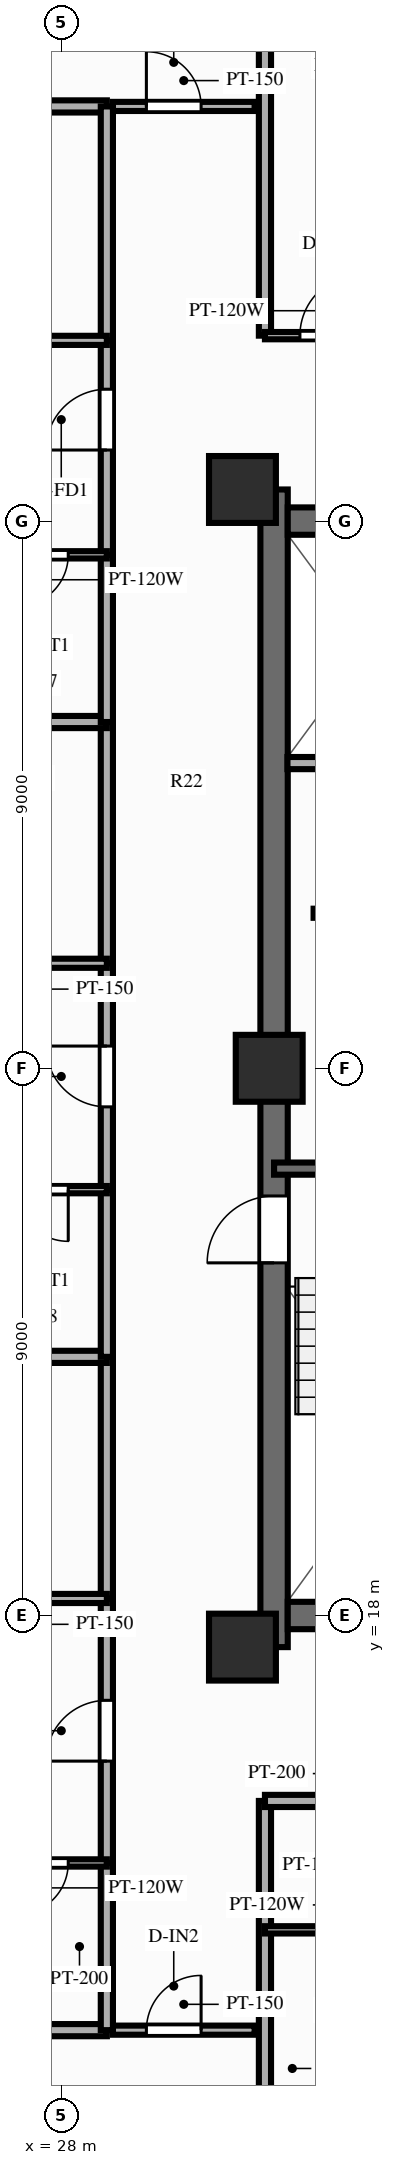
"""IFC4 building model, lengths in metres.
Left out: names, types, materials, properties, quantities, classifications, styles, units other than length and angle.
Written with IfcOpenShell. Run it as: python <this file> out.ifc"""

import sys

from ifc_helpers import new_model, si_unit, direction, frame, frame_2d, origin, origin_2d, place, context, subcontext, project, spatial, rectangle, extrude, source, transform, mapped, element, fill, save


model = new_model("IFC4")
c1 = context("Model", 3, precision=1e-05, world=origin(), true_north=direction((0.0, 1.0)))
c2 = subcontext(c1, "Body", "Model", "MODEL_VIEW")
j1 = project(units=[si_unit("LENGTHUNIT", "METRE"), si_unit("PLANEANGLEUNIT", "RADIAN")], contexts=[c1])
p1 = place(None, origin())
s1 = spatial("IfcSite", under=j1, at=p1, CompositionType="ELEMENT")
p2 = place(p1, origin())
s2 = spatial("IfcBuilding", under=s1, at=p2, CompositionType="ELEMENT")
p3 = place(p2, frame((0.0, 0.0, 179.8)))
s3 = spatial("IfcBuildingStorey", under=s2, at=p3, CompositionType="ELEMENT", Elevation=179.8)
p4 = place(p3, frame((31.5, 17.48, 0.0), z_axis=(0.0, 0.0, 1.0), x_axis=(0.0, 1.0, 0.0)))
e1 = element("IfcWall", 1, at=p4, inside=s3, PredefinedType="SHEAR", context=c2, shape_type="SweptSolid", body=[
    extrude(rectangle(XDim=19.04, YDim=0.45, at=frame_2d((9.52, 0.0))), origin(), (0.0, 0.0, 1.0), 3.0),
])
p5 = place(p4, frame((6.32, 0.0, 0.0)))
e2 = element("IfcOpeningElement", 2, at=p5, cuts=e1, PredefinedType="OPENING", context=c2, shape_type="SweptSolid", body=[
    extrude(rectangle(XDim=1.1, YDim=2.15, at=frame_2d((0.55, 1.075))), frame((0.0, 0.237, 0.0), z_axis=(0.0, -1.0, 0.0), x_axis=(1.0, 0.0, 0.0)), (0.0, 0.0, 1.0), 0.474),
])
p6 = place(p3, frame((31.725, 18.0, 0.0), z_axis=(0.0, 0.0, 1.0), x_axis=(1.0, 0.0, 0.0)))
e3 = element("IfcWall", 3, at=p6, inside=s3, PredefinedType="SHEAR", context=c2, shape_type="SweptSolid", body=[
    extrude(rectangle(XDim=12.55, YDim=0.45, at=frame_2d((6.275, 0.0))), origin(), (0.0, 0.0, 1.0), 3.0),
])
p7 = place(p3, frame((31.725, 36.0, 0.0), z_axis=(0.0, 0.0, 1.0), x_axis=(1.0, 0.0, 0.0)))
e4 = element("IfcWall", 4, at=p7, inside=s3, PredefinedType="SHEAR", context=c2, shape_type="SweptSolid", body=[
    extrude(rectangle(XDim=12.55, YDim=0.45, at=frame_2d((6.275, 0.0))), origin(), (0.0, 0.0, 1.0), 3.0),
])
p8 = place(p7, frame((5.225, 0.0, 0.0), z_axis=(0.0, 0.0, 1.0), x_axis=(-1.0, 0.0, 0.0)))
e5 = element("IfcOpeningElement", 5, at=p8, cuts=e4, PredefinedType="OPENING", context=c2, shape_type="SweptSolid", body=[
    extrude(rectangle(XDim=1.4, YDim=2.15, at=frame_2d((0.7, 1.075))), frame((0.0, 0.237, 0.0), z_axis=(0.0, -1.0, 0.0), x_axis=(1.0, 0.0, 0.0)), (0.0, 0.0, 1.0), 0.474),
])
m1 = source(origin(), c2, "Body", "SweptSolid", [
    extrude(rectangle(XDim=1.1, YDim=1.1, at=origin_2d()), origin(), (0.0, 0.0, 1.0), 3.0),
])
for number, where, z_axis, x_axis in (
    (6, (30.98, 17.48, 0.0), (0.0, 0.0, 1.0), (1.0, 0.0, 0.0)),
    (7, (30.98, 36.52, 0.0), (0.0, 0.0, 1.0), (1.0, 0.0, 0.0)),
    (8, (31.42, 27.0, 0.0), (0.0, 0.0, 1.0), (1.0, 0.0, 0.0)),
):
    element("IfcColumn", number, at=place(p3, frame(where, z_axis=z_axis, x_axis=x_axis)), inside=s3, PredefinedType="COLUMN", context=c2, shape_type="MappedRepresentation", body=[
        mapped(m1, transform((0.0, 0.0, 0.0), scale=1.0)),
    ])
p9 = place(p3, frame((32.15, 29.55, 0.0), z_axis=(0.0, 0.0, 1.0), x_axis=(1.0, 0.0, 0.0)))
e9 = element("IfcWall", 9, at=p9, inside=s3, PredefinedType="PARTITIONING", context=c2, shape_type="SweptSolid", body=[
    extrude(rectangle(XDim=2.27, YDim=0.15, at=frame_2d((1.135, 0.0))), origin(), (0.0, 0.0, 1.0), 2.79),
])
p10 = place(p3, frame((31.5, 25.35, 0.0), z_axis=(0.0, 0.0, 1.0), x_axis=(1.0, 0.0, 0.0)))
e10 = element("IfcWall", 10, at=p10, inside=s3, PredefinedType="SOLIDWALL", context=c2, shape_type="SweptSolid", body=[
    extrude(rectangle(XDim=3.93, YDim=0.2, at=frame_2d((1.965, 0.0))), origin(), (0.0, 0.0, 1.0), 2.79),
])
p11 = place(p3, frame((31.72, 32.02, 0.0), z_axis=(0.0, 0.0, 1.0), x_axis=(1.0, 0.0, 0.0)))
e11 = element("IfcWall", 11, at=p11, inside=s3, PredefinedType="PARTITIONING", context=c2, shape_type="SweptSolid", body=[
    extrude(rectangle(XDim=2.8, YDim=0.2, at=frame_2d((1.4, 0.0))), origin(), (0.0, 0.0, 1.0), 2.79),
])
p12 = place(p3, frame((28.85, 11.18, 0.0), z_axis=(0.0, 0.0, 1.0), x_axis=(1.0, 0.0, 0.0)))
e12 = element("IfcWall", 12, at=p12, inside=s3, PredefinedType="PARTITIONING", context=c2, shape_type="SweptSolid", body=[
    extrude(rectangle(XDim=2.33, YDim=0.15, at=frame_2d((1.165, 0.0))), origin(), (0.0, 0.0, 1.0), 2.79),
])
p13 = place(p12, frame((0.55, 0.0, 0.0)))
e13 = element("IfcOpeningElement", 13, at=p13, cuts=e12, PredefinedType="OPENING", context=c2, shape_type="SweptSolid", body=[
    extrude(rectangle(XDim=0.9, YDim=2.1, at=frame_2d((0.45, 1.05))), frame((0.0, 0.087, 0.0), z_axis=(0.0, -1.0, 0.0), x_axis=(1.0, 0.0, 0.0)), (0.0, 0.0, 1.0), 0.174),
])
p14 = place(p3, frame((28.85, 42.82, 0.0), z_axis=(0.0, 0.0, 1.0), x_axis=(1.0, 0.0, 0.0)))
e14 = element("IfcWall", 14, at=p14, inside=s3, PredefinedType="PARTITIONING", context=c2, shape_type="SweptSolid", body=[
    extrude(rectangle(XDim=2.33, YDim=0.15, at=frame_2d((1.165, 0.0))), origin(), (0.0, 0.0, 1.0), 2.79),
])
p15 = place(p14, frame((0.55, 0.0, 0.0)))
e15 = element("IfcOpeningElement", 15, at=p15, cuts=e14, PredefinedType="OPENING", context=c2, shape_type="SweptSolid", body=[
    extrude(rectangle(XDim=0.9, YDim=2.1, at=frame_2d((0.45, 1.05))), frame((0.0, 0.087, 0.0), z_axis=(0.0, -1.0, 0.0), x_axis=(1.0, 0.0, 0.0)), (0.0, 0.0, 1.0), 0.174),
])
p16 = place(p3, frame((31.35, 14.95, 0.0), z_axis=(0.0, 0.0, 1.0), x_axis=(0.0, -1.0, 0.0)))
e16 = element("IfcWall", 16, at=p16, inside=s3, PredefinedType="PARTITIONING", context=c2, shape_type="SweptSolid", body=[
    extrude(rectangle(XDim=8.8, YDim=0.2, at=frame_2d((4.4, 0.0))), origin(), (0.0, 0.0, 1.0), 2.39),
])
p17 = place(p3, frame((31.35, 14.95, 0.0), z_axis=(0.0, 0.0, 1.0), x_axis=(1.0, 0.0, 0.0)))
e17 = element("IfcWall", 17, at=p17, inside=s3, PredefinedType="PARTITIONING", context=c2, shape_type="SweptSolid", body=[
    extrude(rectangle(XDim=2.2, YDim=0.2, at=frame_2d((1.1, 0.0))), origin(), (0.0, 0.0, 1.0), 2.79),
])
p18 = place(p3, frame((31.35, 12.83, 0.0), z_axis=(0.0, 0.0, 1.0), x_axis=(1.0, 0.0, 0.0)))
e18 = element("IfcWall", 18, at=p18, inside=s3, PredefinedType="PARTITIONING", context=c2, shape_type="SweptSolid", body=[
    extrude(rectangle(XDim=2.2, YDim=0.12, at=frame_2d((1.1, 0.0))), origin(), (0.0, 0.0, 1.0), 2.79),
])
p19 = place(p3, frame((31.35, 39.05, 0.0), z_axis=(0.0, 0.0, 1.0), x_axis=(0.0, 1.0, 0.0)))
e19 = element("IfcWall", 19, at=p19, inside=s3, PredefinedType="PARTITIONING", context=c2, shape_type="SweptSolid", body=[
    extrude(rectangle(XDim=8.8, YDim=0.2, at=frame_2d((4.4, 0.0))), origin(), (0.0, 0.0, 1.0), 2.39),
])
p20 = place(p3, frame((31.35, 39.05, 0.0), z_axis=(0.0, 0.0, 1.0), x_axis=(1.0, 0.0, 0.0)))
e20 = element("IfcWall", 20, at=p20, inside=s3, PredefinedType="PARTITIONING", context=c2, shape_type="SweptSolid", body=[
    extrude(rectangle(XDim=2.15, YDim=0.12, at=frame_2d((1.075, 0.0))), origin(), (0.0, 0.0, 1.0), 2.79),
])
p21 = place(p20, frame((0.575, 0.0, 0.0)))
e21 = element("IfcOpeningElement", 21, at=p21, cuts=e20, PredefinedType="OPENING", context=c2, shape_type="SweptSolid", body=[
    extrude(rectangle(XDim=1.0, YDim=2.1, at=frame_2d((0.5, 1.05))), frame((0.0, 0.072, 0.0), z_axis=(0.0, -1.0, 0.0), x_axis=(1.0, 0.0, 0.0)), (0.0, 0.0, 1.0), 0.144),
])
for number, where, z_axis, x_axis in (
    (22, (28.75, 11.18, 0.0), (0.0, 0.0, 1.0), (-1.0, 0.0, 0.0)),
    (23, (28.75, 42.82, 0.0), (0.0, 0.0, 1.0), (-1.0, 0.0, 0.0)),
):
    element("IfcWall", number, at=place(p3, frame(where, z_axis=z_axis, x_axis=x_axis)), inside=s3, PredefinedType="PARTITIONING", context=c2, shape_type="SweptSolid", body=[
        extrude(rectangle(XDim=10.85, YDim=0.2, at=frame_2d((5.425, 0.0))), origin(), (0.0, 0.0, 1.0), 2.79),
    ])
p22 = place(p3, frame((28.75, 11.18, 0.0), z_axis=(0.0, 0.0, 1.0), x_axis=(0.0, 1.0, 0.0)))
e24 = element("IfcWall", 24, at=p22, inside=s3, PredefinedType="PARTITIONING", context=c2, shape_type="SweptSolid", body=[
    extrude(rectangle(XDim=2.75, YDim=0.2, at=frame_2d((1.375, 0.0))), origin(), (0.0, 0.0, 1.0), 2.79),
])
p23 = place(p3, frame((28.75, 13.93, 0.0), z_axis=(0.0, 0.0, 1.0), x_axis=(0.0, 1.0, 0.0)))
e25 = element("IfcWall", 25, at=p23, inside=s3, PredefinedType="PARTITIONING", context=c2, shape_type="SweptSolid", body=[
    extrude(rectangle(XDim=4.35, YDim=0.2, at=frame_2d((2.175, 0.0))), origin(), (0.0, 0.0, 1.0), 2.79),
])
p24 = place(p23, frame((1.675, 0.0, 0.0)))
e26 = element("IfcOpeningElement", 26, at=p24, cuts=e25, PredefinedType="OPENING", context=c2, shape_type="SweptSolid", body=[
    extrude(rectangle(XDim=1.0, YDim=2.15, at=frame_2d((0.5, 1.075))), frame((0.0, 0.112, 0.0), z_axis=(0.0, -1.0, 0.0), x_axis=(1.0, 0.0, 0.0)), (0.0, 0.0, 1.0), 0.224),
])
p25 = place(p3, frame((28.75, 18.28, 0.0), z_axis=(0.0, 0.0, 1.0), x_axis=(0.0, 1.0, 0.0)))
e27 = element("IfcWall", 27, at=p25, inside=s3, PredefinedType="PARTITIONING", context=c2, shape_type="SweptSolid", body=[
    extrude(rectangle(XDim=3.974, YDim=0.2, at=frame_2d((1.987, 0.0))), origin(), (0.0, 0.0, 1.0), 2.79),
])
p26 = place(p3, frame((28.75, 13.93, 0.0), z_axis=(0.0, 0.0, 1.0), x_axis=(-1.0, 0.0, 0.0)))
e28 = element("IfcWall", 28, at=p26, inside=s3, PredefinedType="PARTITIONING", context=c2, shape_type="SweptSolid", body=[
    extrude(rectangle(XDim=2.12, YDim=0.12, at=frame_2d((1.06, 0.0))), origin(), (0.0, 0.0, 1.0), 2.79),
])
p27 = place(p26, frame((0.635, 0.0, 0.0)))
e29 = element("IfcOpeningElement", 29, at=p27, cuts=e28, PredefinedType="OPENING", context=c2, shape_type="SweptSolid", body=[
    extrude(rectangle(XDim=0.85, YDim=2.05, at=frame_2d((0.425, 1.025))), frame((0.0, 0.072, 0.0), z_axis=(0.0, -1.0, 0.0), x_axis=(1.0, 0.0, 0.0)), (0.0, 0.0, 1.0), 0.144),
])
p28 = place(p3, frame((28.75, 18.28, 0.0), z_axis=(0.0, 0.0, 1.0), x_axis=(-1.0, 0.0, 0.0)))
e30 = element("IfcWall", 30, at=p28, inside=s3, PredefinedType="PARTITIONING", context=c2, shape_type="SweptSolid", body=[
    extrude(rectangle(XDim=3.16, YDim=0.15, at=frame_2d((1.58, 0.0))), origin(), (0.0, 0.0, 1.0), 2.79),
])
p29 = place(p28, frame((1.13, 0.0, 0.0)))
e31 = element("IfcOpeningElement", 31, at=p29, cuts=e30, PredefinedType="OPENING", context=c2, shape_type="SweptSolid", body=[
    extrude(rectangle(XDim=0.9, YDim=2.1, at=frame_2d((0.45, 1.05))), frame((0.0, 0.087, 0.0), z_axis=(0.0, -1.0, 0.0), x_axis=(1.0, 0.0, 0.0)), (0.0, 0.0, 1.0), 0.174),
])
p30 = place(p3, frame((28.75, 22.254, 0.0), z_axis=(0.0, 0.0, 1.0), x_axis=(-1.0, 0.0, 0.0)))
e32 = element("IfcWall", 32, at=p30, inside=s3, PredefinedType="PARTITIONING", context=c2, shape_type="SweptSolid", body=[
    extrude(rectangle(XDim=10.85, YDim=0.2, at=frame_2d((5.425, 0.0))), origin(), (0.0, 0.0, 1.0), 2.39),
])
p31 = place(p3, frame((28.75, 22.254, 0.0), z_axis=(0.0, 0.0, 1.0), x_axis=(0.0, 1.0, 0.0)))
e33 = element("IfcWall", 33, at=p31, inside=s3, PredefinedType="PARTITIONING", context=c2, shape_type="SweptSolid", body=[
    extrude(rectangle(XDim=2.75, YDim=0.2, at=frame_2d((1.375, 0.0))), origin(), (0.0, 0.0, 1.0), 2.79),
])
p32 = place(p3, frame((28.75, 25.004, 0.0), z_axis=(0.0, 0.0, 1.0), x_axis=(0.0, 1.0, 0.0)))
e34 = element("IfcWall", 34, at=p32, inside=s3, PredefinedType="PARTITIONING", context=c2, shape_type="SweptSolid", body=[
    extrude(rectangle(XDim=3.724, YDim=0.2, at=frame_2d((1.862, 0.0))), origin(), (0.0, 0.0, 1.0), 2.79),
])
p33 = place(p32, frame((1.362, 0.0, 0.0)))
e35 = element("IfcOpeningElement", 35, at=p33, cuts=e34, PredefinedType="OPENING", context=c2, shape_type="SweptSolid", body=[
    extrude(rectangle(XDim=1.0, YDim=2.15, at=frame_2d((0.5, 1.075))), frame((0.0, 0.112, 0.0), z_axis=(0.0, -1.0, 0.0), x_axis=(1.0, 0.0, 0.0)), (0.0, 0.0, 1.0), 0.224),
])
p34 = place(p3, frame((28.75, 28.728, 0.0), z_axis=(0.0, 0.0, 1.0), x_axis=(0.0, 1.0, 0.0)))
e36 = element("IfcWall", 36, at=p34, inside=s3, PredefinedType="PARTITIONING", context=c2, shape_type="SweptSolid", body=[
    extrude(rectangle(XDim=3.968, YDim=0.2, at=frame_2d((1.984, 0.0))), origin(), (0.0, 0.0, 1.0), 2.79),
])
p35 = place(p3, frame((28.75, 25.004, 0.0), z_axis=(0.0, 0.0, 1.0), x_axis=(-1.0, 0.0, 0.0)))
e37 = element("IfcWall", 37, at=p35, inside=s3, PredefinedType="PARTITIONING", context=c2, shape_type="SweptSolid", body=[
    extrude(rectangle(XDim=2.12, YDim=0.12, at=frame_2d((1.06, 0.0))), origin(), (0.0, 0.0, 1.0), 2.79),
])
p36 = place(p35, frame((0.635, 0.0, 0.0)))
e38 = element("IfcOpeningElement", 38, at=p36, cuts=e37, PredefinedType="OPENING", context=c2, shape_type="SweptSolid", body=[
    extrude(rectangle(XDim=0.85, YDim=2.05, at=frame_2d((0.425, 1.025))), frame((0.0, 0.072, 0.0), z_axis=(0.0, -1.0, 0.0), x_axis=(1.0, 0.0, 0.0)), (0.0, 0.0, 1.0), 0.144),
])
p37 = place(p3, frame((28.75, 28.728, 0.0), z_axis=(0.0, 0.0, 1.0), x_axis=(-1.0, 0.0, 0.0)))
e39 = element("IfcWall", 39, at=p37, inside=s3, PredefinedType="PARTITIONING", context=c2, shape_type="SweptSolid", body=[
    extrude(rectangle(XDim=3.16, YDim=0.15, at=frame_2d((1.58, 0.0))), origin(), (0.0, 0.0, 1.0), 2.79),
])
p38 = place(p37, frame((1.13, 0.0, 0.0)))
e40 = element("IfcOpeningElement", 40, at=p38, cuts=e39, PredefinedType="OPENING", context=c2, shape_type="SweptSolid", body=[
    extrude(rectangle(XDim=0.9, YDim=2.1, at=frame_2d((0.45, 1.05))), frame((0.0, 0.087, 0.0), z_axis=(0.0, -1.0, 0.0), x_axis=(1.0, 0.0, 0.0)), (0.0, 0.0, 1.0), 0.174),
])
p39 = place(p3, frame((28.75, 32.695, 0.0), z_axis=(0.0, 0.0, 1.0), x_axis=(-1.0, 0.0, 0.0)))
e41 = element("IfcWall", 41, at=p39, inside=s3, PredefinedType="PARTITIONING", context=c2, shape_type="SweptSolid", body=[
    extrude(rectangle(XDim=10.85, YDim=0.2, at=frame_2d((5.425, 0.0))), origin(), (0.0, 0.0, 1.0), 2.79),
])
p40 = place(p3, frame((28.75, 32.695, 0.0), z_axis=(0.0, 0.0, 1.0), x_axis=(0.0, 1.0, 0.0)))
e42 = element("IfcWall", 42, at=p40, inside=s3, PredefinedType="PARTITIONING", context=c2, shape_type="SweptSolid", body=[
    extrude(rectangle(XDim=2.75, YDim=0.2, at=frame_2d((1.375, 0.0))), origin(), (0.0, 0.0, 1.0), 2.79),
])
p41 = place(p3, frame((28.75, 35.445, 0.0), z_axis=(0.0, 0.0, 1.0), x_axis=(0.0, 1.0, 0.0)))
e43 = element("IfcWall", 43, at=p41, inside=s3, PredefinedType="PARTITIONING", context=c2, shape_type="SweptSolid", body=[
    extrude(rectangle(XDim=3.527, YDim=0.2, at=frame_2d((1.764, 0.0))), origin(), (0.0, 0.0, 1.0), 2.79),
])
p42 = place(p41, frame((1.724, 0.0, 0.0)))
e44 = element("IfcOpeningElement", 44, at=p42, cuts=e43, PredefinedType="OPENING", context=c2, shape_type="SweptSolid", body=[
    extrude(rectangle(XDim=1.0, YDim=2.15, at=frame_2d((0.5, 1.075))), frame((0.0, 0.112, 0.0), z_axis=(0.0, -1.0, 0.0), x_axis=(1.0, 0.0, 0.0)), (0.0, 0.0, 1.0), 0.224),
])
p43 = place(p3, frame((28.75, 38.973, 0.0), z_axis=(0.0, 0.0, 1.0), x_axis=(0.0, 1.0, 0.0)))
e45 = element("IfcWall", 45, at=p43, inside=s3, PredefinedType="PARTITIONING", context=c2, shape_type="SweptSolid", body=[
    extrude(rectangle(XDim=3.847, YDim=0.2, at=frame_2d((1.924, 0.0))), origin(), (0.0, 0.0, 1.0), 2.79),
])
p44 = place(p3, frame((28.75, 35.445, 0.0), z_axis=(0.0, 0.0, 1.0), x_axis=(-1.0, 0.0, 0.0)))
e46 = element("IfcWall", 46, at=p44, inside=s3, PredefinedType="PARTITIONING", context=c2, shape_type="SweptSolid", body=[
    extrude(rectangle(XDim=2.12, YDim=0.12, at=frame_2d((1.06, 0.0))), origin(), (0.0, 0.0, 1.0), 2.79),
])
p45 = place(p44, frame((0.635, 0.0, 0.0)))
e47 = element("IfcOpeningElement", 47, at=p45, cuts=e46, PredefinedType="OPENING", context=c2, shape_type="SweptSolid", body=[
    extrude(rectangle(XDim=0.85, YDim=2.05, at=frame_2d((0.425, 1.025))), frame((0.0, 0.072, 0.0), z_axis=(0.0, -1.0, 0.0), x_axis=(1.0, 0.0, 0.0)), (0.0, 0.0, 1.0), 0.144),
])
p46 = place(p3, frame((28.75, 38.973, 0.0), z_axis=(0.0, 0.0, 1.0), x_axis=(-1.0, 0.0, 0.0)))
e48 = element("IfcWall", 48, at=p46, inside=s3, PredefinedType="PARTITIONING", context=c2, shape_type="SweptSolid", body=[
    extrude(rectangle(XDim=3.16, YDim=0.15, at=frame_2d((1.58, 0.0))), origin(), (0.0, 0.0, 1.0), 2.79),
])
p47 = place(p46, frame((1.13, 0.0, 0.0)))
e49 = element("IfcOpeningElement", 49, at=p47, cuts=e48, PredefinedType="OPENING", context=c2, shape_type="SweptSolid", body=[
    extrude(rectangle(XDim=0.9, YDim=2.1, at=frame_2d((0.45, 1.05))), frame((0.0, 0.087, 0.0), z_axis=(0.0, -1.0, 0.0), x_axis=(1.0, 0.0, 0.0)), (0.0, 0.0, 1.0), 0.174),
])
m2 = source(origin(), c2, "Body", "SweptSolid", [
    extrude(rectangle(XDim=1.1, YDim=2.15, at=frame_2d((0.55, 1.075))), frame((0.0, 0.025, 0.0), z_axis=(0.0, -1.0, 0.0), x_axis=(1.0, 0.0, 0.0)), (0.0, 0.0, 1.0), 0.05),
])
p48 = place(p5, origin())
e50 = element("IfcDoor", 50, at=p48, inside=s3, OperationType="SINGLE_SWING_LEFT", PredefinedType="DOOR", context=c2, shape_type="MappedRepresentation", body=[
    mapped(m2, transform((0.0, 0.0, 0.0), scale=1.0)),
])
fill(e2, e50)
m3 = source(origin(), c2, "Body", "SweptSolid", [
    extrude(rectangle(XDim=0.9, YDim=2.1, at=frame_2d((0.45, 1.05))), frame((0.0, 0.025, 0.0), z_axis=(0.0, -1.0, 0.0), x_axis=(1.0, 0.0, 0.0)), (0.0, 0.0, 1.0), 0.05),
])
p49 = place(p13, origin())
e51 = element("IfcDoor", 51, at=p49, inside=s3, OperationType="SINGLE_SWING_RIGHT", PredefinedType="DOOR", context=c2, shape_type="MappedRepresentation", body=[
    mapped(m3, transform((0.0, 0.0, 0.0), scale=1.0)),
])
fill(e13, e51)
p50 = place(p15, origin())
e52 = element("IfcDoor", 52, at=p50, inside=s3, OperationType="SINGLE_SWING_LEFT", PredefinedType="DOOR", context=c2, shape_type="MappedRepresentation", body=[
    mapped(m3, transform((0.0, 0.0, 0.0), scale=1.0)),
])
fill(e15, e52)
m4 = source(origin(), c2, "Body", "SweptSolid", [
    extrude(rectangle(XDim=1.0, YDim=2.1, at=frame_2d((0.5, 1.05))), frame((0.0, 0.025, 0.0), z_axis=(0.0, -1.0, 0.0), x_axis=(1.0, 0.0, 0.0)), (0.0, 0.0, 1.0), 0.05),
])
p51 = place(p21, origin())
e53 = element("IfcDoor", 53, at=p51, inside=s3, OperationType="SINGLE_SWING_RIGHT", PredefinedType="DOOR", context=c2, shape_type="MappedRepresentation", body=[
    mapped(m4, transform((0.0, 0.0, 0.0), scale=1.0)),
])
fill(e21, e53)
m5 = source(origin(), c2, "Body", "SweptSolid", [
    extrude(rectangle(XDim=1.0, YDim=2.15, at=frame_2d((0.5, 1.075))), frame((0.0, 0.025, 0.0), z_axis=(0.0, -1.0, 0.0), x_axis=(1.0, 0.0, 0.0)), (0.0, 0.0, 1.0), 0.05),
])
p52 = place(p24, origin())
e54 = element("IfcDoor", 54, at=p52, inside=s3, OperationType="SINGLE_SWING_LEFT", PredefinedType="DOOR", context=c2, shape_type="MappedRepresentation", body=[
    mapped(m5, transform((0.0, 0.0, 0.0), scale=1.0)),
])
fill(e26, e54)
m6 = source(origin(), c2, "Body", "SweptSolid", [
    extrude(rectangle(XDim=0.85, YDim=2.05, at=frame_2d((0.425, 1.025))), frame((0.0, 0.025, 0.0), z_axis=(0.0, -1.0, 0.0), x_axis=(1.0, 0.0, 0.0)), (0.0, 0.0, 1.0), 0.05),
])
p53 = place(p27, origin())
e55 = element("IfcDoor", 55, at=p53, inside=s3, OperationType="SINGLE_SWING_RIGHT", PredefinedType="DOOR", context=c2, shape_type="MappedRepresentation", body=[
    mapped(m6, transform((0.0, 0.0, 0.0), scale=1.0)),
])
fill(e29, e55)
p54 = place(p33, origin())
e56 = element("IfcDoor", 56, at=p54, inside=s3, OperationType="SINGLE_SWING_RIGHT", PredefinedType="DOOR", context=c2, shape_type="MappedRepresentation", body=[
    mapped(m5, transform((0.0, 0.0, 0.0), scale=1.0)),
])
fill(e35, e56)
p55 = place(p36, origin())
e57 = element("IfcDoor", 57, at=p55, inside=s3, OperationType="SINGLE_SWING_LEFT", PredefinedType="DOOR", context=c2, shape_type="MappedRepresentation", body=[
    mapped(m6, transform((0.0, 0.0, 0.0), scale=1.0)),
])
fill(e38, e57)
p56 = place(p42, origin())
e58 = element("IfcDoor", 58, at=p56, inside=s3, OperationType="SINGLE_SWING_LEFT", PredefinedType="DOOR", context=c2, shape_type="MappedRepresentation", body=[
    mapped(m5, transform((0.0, 0.0, 0.0), scale=1.0)),
])
fill(e44, e58)
p57 = place(p45, origin())
e59 = element("IfcDoor", 59, at=p57, inside=s3, OperationType="SINGLE_SWING_RIGHT", PredefinedType="DOOR", context=c2, shape_type="MappedRepresentation", body=[
    mapped(m6, transform((0.0, 0.0, 0.0), scale=1.0)),
])
fill(e47, e59)
save(model, sys.argv[1])
